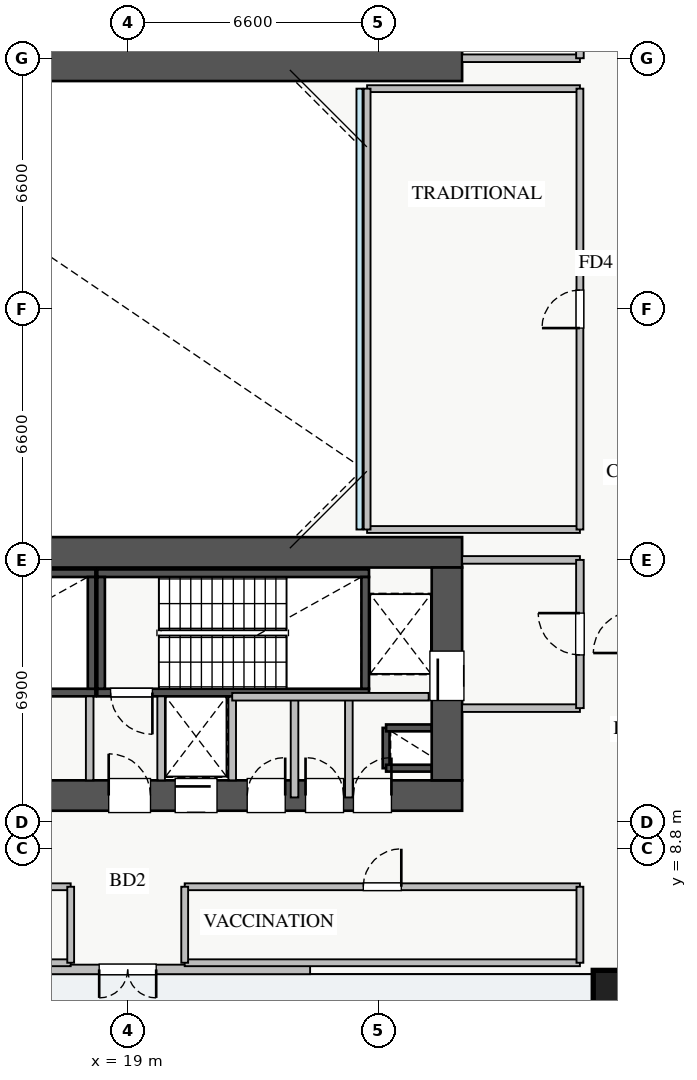
"""IFC4 building model, lengths in metres.
Left out: names, types, materials, properties, quantities, classifications, styles, units other than length and angle.
Written with IfcOpenShell. Run it as: python <this file> out.ifc"""

import sys

from ifc_helpers import new_model, si_unit, direction, frame, frame_2d, origin, origin_2d, place, context, subcontext, project, spatial, rectangle, extrude, source, transform, mapped, element, fill, save


model = new_model("IFC4")
c1 = context("Model", 3, precision=1e-05, world=origin(), true_north=direction((0.0, 1.0)))
c2 = subcontext(c1, "Body", "Model", "MODEL_VIEW")
j1 = project(units=[si_unit("LENGTHUNIT", "METRE"), si_unit("PLANEANGLEUNIT", "RADIAN")], contexts=[c1])
p1 = place(None, origin())
s1 = spatial("IfcSite", under=j1, at=p1, CompositionType="ELEMENT")
p2 = place(p1, origin())
s2 = spatial("IfcBuilding", under=s1, at=p2, CompositionType="ELEMENT")
p3 = place(p2, frame((0.0, 0.0, 13.8)))
s3 = spatial("IfcBuildingStorey", under=s2, at=p3, CompositionType="ELEMENT", Elevation=13.8)
p4 = place(p3, frame((25.8, 10.92, 0.0), z_axis=(0.0, 0.0, 1.0), x_axis=(0.0, 1.0, 0.0)))
e1 = element("IfcWall", 1, at=p4, inside=s3, PredefinedType="SHEAR", context=c2, shape_type="SweptSolid", body=[
    extrude(rectangle(XDim=1.06, YDim=0.18, at=frame_2d((0.53, 0.0))), origin(), (0.0, 0.0, 1.0), 4.15),
])
for number, where, z_axis, x_axis in (
    (2, (25.8, 11.98, 0.0), (0.0, 0.0, 1.0), (1.0, 0.0, 0.0)),
    (3, (25.8, 10.92, 0.0), (0.0, 0.0, 1.0), (1.0, 0.0, 0.0)),
):
    element("IfcWall", number, at=place(p3, frame(where, z_axis=z_axis, x_axis=x_axis)), inside=s3, PredefinedType="SHEAR", context=c2, shape_type="SweptSolid", body=[
        extrude(rectangle(XDim=1.2, YDim=0.18, at=frame_2d((0.6, 0.0))), origin(), (0.0, 0.0, 1.0), 4.15),
    ])
p5 = place(p3, frame((19.88, 12.8, 0.0), z_axis=(0.0, 0.0, 1.0), x_axis=(1.0, 0.0, 0.0)))
e4 = element("IfcWall", 4, at=p5, inside=s3, PredefinedType="SHEAR", context=c2, shape_type="SweptSolid", body=[
    extrude(rectangle(XDim=1.87, YDim=0.18, at=frame_2d((0.935, 0.0))), origin(), (0.0, 0.0, 1.0), 4.15),
])
p6 = place(p3, frame((11.0, 12.91, 0.0), z_axis=(0.0, 0.0, 1.0), x_axis=(1.0, 0.0, 0.0)))
e5 = element("IfcWall", 5, at=p6, inside=s3, PredefinedType="SHEAR", context=c2, shape_type="SweptSolid", body=[
    extrude(rectangle(XDim=7.15, YDim=0.2, at=frame_2d((3.575, 0.0))), origin(), (0.0, 0.0, 1.0), 4.4),
])
p7 = place(p6, frame((0.35, 0.0, 0.0)))
e6 = element("IfcOpeningElement", 6, at=p7, cuts=e5, PredefinedType="OPENING", context=c2, shape_type="SweptSolid", body=[
    extrude(rectangle(XDim=1.1, YDim=2.05, at=frame_2d((0.55, 1.025))), frame((0.0, 0.11, 0.0), z_axis=(0.0, -1.0, 0.0), x_axis=(1.0, 0.0, 0.0)), (0.0, 0.0, 1.0), 0.22),
])
p8 = place(p3, frame((11.0, 16.05, 0.0), z_axis=(0.0, 0.0, 1.0), x_axis=(1.0, 0.0, 0.0)))
e7 = element("IfcWall", 7, at=p8, inside=s3, PredefinedType="SHEAR", context=c2, shape_type="SweptSolid", body=[
    extrude(rectangle(XDim=7.15, YDim=0.2, at=frame_2d((3.575, 0.0))), origin(), (0.0, 0.0, 1.0), 4.4),
])
p9 = place(p3, frame((18.05, 13.01, 0.0), z_axis=(0.0, 0.0, 1.0), x_axis=(0.0, 1.0, 0.0)))
e8 = element("IfcWall", 8, at=p9, inside=s3, PredefinedType="SHEAR", context=c2, shape_type="SweptSolid", body=[
    extrude(rectangle(XDim=2.94, YDim=0.2, at=frame_2d((1.47, 0.0))), origin(), (0.0, 0.0, 1.0), 4.4),
])
p10 = place(p3, frame((18.2, 12.91, 0.0), z_axis=(0.0, 0.0, 1.0), x_axis=(1.0, 0.0, 0.0)))
e9 = element("IfcWall", 9, at=p10, inside=s3, PredefinedType="SHEAR", context=c2, shape_type="SweptSolid", body=[
    extrude(rectangle(XDim=7.15, YDim=0.2, at=frame_2d((3.575, 0.0))), origin(), (0.0, 0.0, 1.0), 4.4),
])
p11 = place(p10, frame((0.35, 0.0, 0.0)))
e10 = element("IfcOpeningElement", 10, at=p11, cuts=e9, PredefinedType="OPENING", context=c2, shape_type="SweptSolid", body=[
    extrude(rectangle(XDim=1.1, YDim=2.05, at=frame_2d((0.55, 1.025))), frame((0.0, 0.11, 0.0), z_axis=(0.0, -1.0, 0.0), x_axis=(1.0, 0.0, 0.0)), (0.0, 0.0, 1.0), 0.22),
])
p12 = place(p3, frame((18.2, 16.05, 0.0), z_axis=(0.0, 0.0, 1.0), x_axis=(1.0, 0.0, 0.0)))
e11 = element("IfcWall", 11, at=p12, inside=s3, PredefinedType="SHEAR", context=c2, shape_type="SweptSolid", body=[
    extrude(rectangle(XDim=7.15, YDim=0.2, at=frame_2d((3.575, 0.0))), origin(), (0.0, 0.0, 1.0), 4.4),
])
for number, where, z_axis, x_axis in (
    (12, (18.3, 13.01, 0.0), (0.0, 0.0, 1.0), (0.0, 1.0, 0.0)),
    (13, (25.25, 13.01, 0.0), (0.0, 0.0, 1.0), (0.0, 1.0, 0.0)),
):
    element("IfcWall", number, at=place(p3, frame(where, z_axis=z_axis, x_axis=x_axis)), inside=s3, PredefinedType="SHEAR", context=c2, shape_type="SweptSolid", body=[
        extrude(rectangle(XDim=2.94, YDim=0.2, at=frame_2d((1.47, 0.0))), origin(), (0.0, 0.0, 1.0), 4.4),
    ])
p13 = place(p3, frame((10.2, 29.4, 0.0), z_axis=(0.0, 0.0, 1.0), x_axis=(1.0, 0.0, 0.0)))
e14 = element("IfcWall", 14, at=p13, inside=s3, PredefinedType="SHEAR", context=c2, shape_type="SweptSolid", body=[
    extrude(rectangle(XDim=17.6, YDim=0.8, at=frame_2d((8.8, 0.0))), origin(), (0.0, 0.0, 1.0), 4.4),
])
p14 = place(p3, frame((10.2, 10.2, 0.0), z_axis=(0.0, 0.0, 1.0), x_axis=(1.0, 0.0, 0.0)))
e15 = element("IfcWall", 15, at=p14, inside=s3, PredefinedType="SHEAR", context=c2, shape_type="SweptSolid", body=[
    extrude(rectangle(XDim=17.6, YDim=0.8, at=frame_2d((8.8, 0.0))), origin(), (0.0, 0.0, 1.0), 4.4),
])
p15 = place(p14, frame((1.15, 0.0, 0.0)))
e16 = element("IfcOpeningElement", 16, at=p15, cuts=e15, PredefinedType="OPENING", context=c2, shape_type="SweptSolid", body=[
    extrude(rectangle(XDim=1.1, YDim=2.05, at=frame_2d((0.55, 1.025))), frame((0.0, 0.41, 0.0), z_axis=(0.0, -1.0, 0.0), x_axis=(1.0, 0.0, 0.0)), (0.0, 0.0, 1.0), 0.82),
])
p16 = place(p14, frame((8.3, 0.0, 0.0)))
e17 = element("IfcOpeningElement", 17, at=p16, cuts=e15, PredefinedType="OPENING", context=c2, shape_type="SweptSolid", body=[
    extrude(rectangle(XDim=1.1, YDim=2.05, at=frame_2d((0.55, 1.025))), frame((0.0, 0.41, 0.0), z_axis=(0.0, -1.0, 0.0), x_axis=(1.0, 0.0, 0.0)), (0.0, 0.0, 1.0), 0.82),
])
p17 = place(p14, frame((10.05, 0.0, 0.0)))
e18 = element("IfcOpeningElement", 18, at=p17, cuts=e15, PredefinedType="OPENING", context=c2, shape_type="SweptSolid", body=[
    extrude(rectangle(XDim=1.1, YDim=2.05, at=frame_2d((0.55, 1.025))), frame((0.0, 0.41, 0.0), z_axis=(0.0, -1.0, 0.0), x_axis=(1.0, 0.0, 0.0)), (0.0, 0.0, 1.0), 0.82),
])
p18 = place(p14, frame((14.74, 0.0, 0.0)))
e19 = element("IfcOpeningElement", 19, at=p18, cuts=e15, PredefinedType="OPENING", context=c2, shape_type="SweptSolid", body=[
    extrude(rectangle(XDim=1.0, YDim=2.05, at=frame_2d((0.5, 1.025))), frame((0.0, 0.41, 0.0), z_axis=(0.0, -1.0, 0.0), x_axis=(1.0, 0.0, 0.0)), (0.0, 0.0, 1.0), 0.82),
])
p19 = place(p14, frame((11.945, 0.0, 0.0)))
e20 = element("IfcOpeningElement", 20, at=p19, cuts=e15, PredefinedType="OPENING", context=c2, shape_type="SweptSolid", body=[
    extrude(rectangle(XDim=1.0, YDim=2.05, at=frame_2d((0.5, 1.025))), frame((0.0, 0.41, 0.0), z_axis=(0.0, -1.0, 0.0), x_axis=(1.0, 0.0, 0.0)), (0.0, 0.0, 1.0), 0.82),
])
p20 = place(p14, frame((13.48, 0.0, 0.0)))
e21 = element("IfcOpeningElement", 21, at=p20, cuts=e15, PredefinedType="OPENING", context=c2, shape_type="SweptSolid", body=[
    extrude(rectangle(XDim=1.0, YDim=2.05, at=frame_2d((0.5, 1.025))), frame((0.0, 0.41, 0.0), z_axis=(0.0, -1.0, 0.0), x_axis=(1.0, 0.0, 0.0)), (0.0, 0.0, 1.0), 0.82),
])
p21 = place(p3, frame((10.2, 16.6, 0.0), z_axis=(0.0, 0.0, 1.0), x_axis=(1.0, 0.0, 0.0)))
e22 = element("IfcWall", 22, at=p21, inside=s3, PredefinedType="SHEAR", context=c2, shape_type="SweptSolid", body=[
    extrude(rectangle(XDim=17.6, YDim=0.8, at=frame_2d((8.8, 0.0))), origin(), (0.0, 0.0, 1.0), 4.4),
])
p22 = place(p3, frame((27.4, 10.6, 0.0), z_axis=(0.0, 0.0, 1.0), x_axis=(0.0, 1.0, 0.0)))
e23 = element("IfcWall", 23, at=p22, inside=s3, PredefinedType="SHEAR", context=c2, shape_type="SweptSolid", body=[
    extrude(rectangle(XDim=5.6, YDim=0.8, at=frame_2d((2.8, 0.0))), origin(), (0.0, 0.0, 1.0), 4.4),
])
p23 = place(p22, frame((2.1, 0.0, 0.0)))
e24 = element("IfcOpeningElement", 24, at=p23, cuts=e23, PredefinedType="OPENING", context=c2, shape_type="SweptSolid", body=[
    extrude(rectangle(XDim=1.3, YDim=2.05, at=frame_2d((0.65, 1.025))), frame((0.0, 0.41, 0.0), z_axis=(0.0, -1.0, 0.0), x_axis=(1.0, 0.0, 0.0)), (0.0, 0.0, 1.0), 0.82),
])
m1 = source(origin(), c2, "Body", "SweptSolid", [
    extrude(rectangle(XDim=1.5, YDim=1.5, at=origin_2d()), origin(), (0.0, 0.0, 1.0), 4.4),
])
p24 = place(p3, frame((32.0, 4.85, 0.0), z_axis=(0.0, 0.0, 1.0), x_axis=(1.0, 0.0, 0.0)))
e25 = element("IfcColumn", 25, at=p24, inside=s3, PredefinedType="COLUMN", context=c2, shape_type="MappedRepresentation", body=[
    mapped(m1, transform((0.0, 0.0, 0.0), x_axis=(1.0, 0.0, 0.0), y_axis=(0.0, 1.0, 0.0), z_axis=(0.0, 0.0, 1.0), scale=1.0)),
])
p25 = place(p3, frame((14.2, 5.625, 0.0), z_axis=(0.0, 0.0, 1.0), x_axis=(1.0, 0.0, 0.0)))
e26 = element("IfcWall", 26, at=p25, inside=s3, PredefinedType="STANDARD", context=c2, shape_type="SweptSolid", body=[
    extrude(rectangle(XDim=9.6, YDim=0.25, at=frame_2d((4.8, 0.0))), origin(), (0.0, 0.0, 1.0), 3.69),
])
p26 = place(p25, frame((4.05, 0.0, 0.0)))
e27 = element("IfcOpeningElement", 27, at=p26, cuts=e26, PredefinedType="OPENING", context=c2, shape_type="SweptSolid", body=[
    extrude(rectangle(XDim=1.5, YDim=2.15, at=frame_2d((0.75, 1.075))), frame((0.0, 0.135, 0.0), z_axis=(0.0, -1.0, 0.0), x_axis=(1.0, 0.0, 0.0)), (0.0, 0.0, 1.0), 0.27),
])
p27 = place(p3, frame((27.8, 29.6, 0.0), z_axis=(0.0, 0.0, 1.0), x_axis=(1.0, 0.0, 0.0)))
e28 = element("IfcWall", 28, at=p27, inside=s3, PredefinedType="PARTITIONING", context=c2, shape_type="SweptSolid", body=[
    extrude(rectangle(XDim=3.1, YDim=0.2, at=frame_2d((1.55, 0.0))), origin(), (0.0, 0.0, 1.0), 3.445),
])
p28 = place(p3, frame((30.9, 29.6, 0.0), z_axis=(0.0, 0.0, 1.0), x_axis=(0.0, 1.0, 0.0)))
e29 = element("IfcWall", 29, at=p28, inside=s3, PredefinedType="PARTITIONING", context=c2, shape_type="SweptSolid", body=[
    extrude(rectangle(XDim=3.9, YDim=0.2, at=frame_2d((1.95, 0.0))), origin(), (0.0, 0.0, 1.0), 4.15),
])
p29 = place(p28, frame((1.4, 0.0, 0.0)))
e30 = element("IfcOpeningElement", 30, at=p29, cuts=e29, PredefinedType="OPENING", context=c2, shape_type="SweptSolid", body=[
    extrude(rectangle(XDim=1.1, YDim=2.05, at=frame_2d((0.55, 1.025))), frame((0.0, 0.11, 0.0), z_axis=(0.0, -1.0, 0.0), x_axis=(1.0, 0.0, 0.0)), (0.0, 0.0, 1.0), 0.22),
])
for number, where, z_axis, x_axis in (
    (31, (27.8, 16.4, 0.0), (0.0, 0.0, 1.0), (1.0, 0.0, 0.0)),
    (32, (27.8, 12.5, 0.0), (0.0, 0.0, 1.0), (1.0, 0.0, 0.0)),
):
    element("IfcWall", number, at=place(p3, frame(where, z_axis=z_axis, x_axis=x_axis)), inside=s3, PredefinedType="PARTITIONING", context=c2, shape_type="SweptSolid", body=[
        extrude(rectangle(XDim=3.1, YDim=0.2, at=frame_2d((1.55, 0.0))), origin(), (0.0, 0.0, 1.0), 3.445),
    ])
p30 = place(p3, frame((30.9, 12.5, 0.0), z_axis=(0.0, 0.0, 1.0), x_axis=(0.0, 1.0, 0.0)))
e33 = element("IfcWall", 33, at=p30, inside=s3, PredefinedType="PARTITIONING", context=c2, shape_type="SweptSolid", body=[
    extrude(rectangle(XDim=3.9, YDim=0.2, at=frame_2d((1.95, 0.0))), origin(), (0.0, 0.0, 1.0), 4.15),
])
p31 = place(p30, frame((1.4, 0.0, 0.0)))
e34 = element("IfcOpeningElement", 34, at=p31, cuts=e33, PredefinedType="OPENING", context=c2, shape_type="SweptSolid", body=[
    extrude(rectangle(XDim=1.1, YDim=2.05, at=frame_2d((0.55, 1.025))), frame((0.0, 0.11, 0.0), z_axis=(0.0, -1.0, 0.0), x_axis=(1.0, 0.0, 0.0)), (0.0, 0.0, 1.0), 0.22),
])
for number, where, z_axis, x_axis in (
    (35, (18.0, 10.6, 0.0), (0.0, 0.0, 1.0), (0.0, 1.0, 0.0)),
    (36, (19.88, 10.6, 0.0), (0.0, 0.0, 1.0), (0.0, 1.0, 0.0)),
):
    element("IfcWall", number, at=place(p3, frame(where, z_axis=z_axis, x_axis=x_axis)), inside=s3, PredefinedType="PARTITIONING", context=c2, shape_type="SweptSolid", body=[
        extrude(rectangle(XDim=2.21, YDim=0.2, at=frame_2d((1.105, 0.0))), origin(), (0.0, 0.0, 1.0), 4.15),
    ])
p32 = place(p3, frame((24.82, 10.15, 0.0), z_axis=(0.0, 0.0, 1.0), x_axis=(0.0, 1.0, 0.0)))
e37 = element("IfcWall", 37, at=p32, inside=s3, PredefinedType="PARTITIONING", context=c2, shape_type="SweptSolid", body=[
    extrude(rectangle(XDim=2.65, YDim=0.2, at=frame_2d((1.325, 0.0))), origin(), (0.0, 0.0, 1.0), 4.15),
])
p33 = place(p3, frame((21.75, 10.6, 0.0), z_axis=(0.0, 0.0, 1.0), x_axis=(0.0, 1.0, 0.0)))
e38 = element("IfcWall", 38, at=p33, inside=s3, PredefinedType="PARTITIONING", context=c2, shape_type="SweptSolid", body=[
    extrude(rectangle(XDim=2.2, YDim=0.2, at=frame_2d((1.1, 0.0))), origin(), (0.0, 0.0, 1.0), 4.15),
])
p34 = place(p3, frame((23.39, 10.15, 0.0), z_axis=(0.0, 0.0, 1.0), x_axis=(0.0, 1.0, 0.0)))
e39 = element("IfcWall", 39, at=p34, inside=s3, PredefinedType="PARTITIONING", context=c2, shape_type="SweptSolid", body=[
    extrude(rectangle(XDim=2.65, YDim=0.2, at=frame_2d((1.325, 0.0))), origin(), (0.0, 0.0, 1.0), 4.15),
])
p35 = place(p3, frame((21.75, 12.8, 0.0), z_axis=(0.0, 0.0, 1.0), x_axis=(1.0, 0.0, 0.0)))
e40 = element("IfcWall", 40, at=p35, inside=s3, PredefinedType="PARTITIONING", context=c2, shape_type="SweptSolid", body=[
    extrude(rectangle(XDim=5.17, YDim=0.2, at=frame_2d((2.585, 0.0))), origin(), (0.0, 0.0, 1.0), 4.15),
])
for number, where, z_axis, x_axis in (
    (41, (25.3, 17.2, 0.0), (0.0, 0.0, 1.0), (1.0, 0.0, 0.0)),
    (42, (25.3, 28.8, 0.0), (0.0, 0.0, 1.0), (1.0, 0.0, 0.0)),
):
    element("IfcWall", number, at=place(p3, frame(where, z_axis=z_axis, x_axis=x_axis)), inside=s3, PredefinedType="PARTITIONING", context=c2, shape_type="SweptSolid", body=[
        extrude(rectangle(XDim=5.6, YDim=0.18, at=frame_2d((2.8, 0.0))), origin(), (0.0, 0.0, 1.0), 4.15),
    ])
p36 = place(p3, frame((25.3, 17.2, 0.0), z_axis=(0.0, 0.0, 1.0), x_axis=(0.0, 1.0, 0.0)))
e43 = element("IfcWall", 43, at=p36, inside=s3, PredefinedType="PARTITIONING", context=c2, shape_type="SweptSolid", body=[
    extrude(rectangle(XDim=11.6, YDim=0.18, at=frame_2d((5.8, 0.0))), origin(), (0.0, 0.0, 1.0), 4.15),
])
p37 = place(p3, frame((30.9, 17.2, 0.0), z_axis=(0.0, 0.0, 1.0), x_axis=(0.0, 1.0, 0.0)))
e44 = element("IfcWall", 44, at=p37, inside=s3, PredefinedType="PARTITIONING", context=c2, shape_type="SweptSolid", body=[
    extrude(rectangle(XDim=11.6, YDim=0.18, at=frame_2d((5.8, 0.0))), origin(), (0.0, 0.0, 1.0), 4.15),
])
p38 = place(p37, frame((5.3, 0.0, 0.0)))
e45 = element("IfcOpeningElement", 45, at=p38, cuts=e44, PredefinedType="OPENING", context=c2, shape_type="SweptSolid", body=[
    extrude(rectangle(XDim=1.0, YDim=2.05, at=frame_2d((0.5, 1.025))), frame((0.0, 0.1, 0.0), z_axis=(0.0, -1.0, 0.0), x_axis=(1.0, 0.0, 0.0)), (0.0, 0.0, 1.0), 0.2),
])
p39 = place(p3, frame((10.2, 5.8, 0.0), z_axis=(0.0, 0.0, 1.0), x_axis=(1.0, 0.0, 0.0)))
e46 = element("IfcWall", 46, at=p39, inside=s3, PredefinedType="PARTITIONING", context=c2, shape_type="SweptSolid", body=[
    extrude(rectangle(XDim=7.3, YDim=0.18, at=frame_2d((3.65, 0.0))), origin(), (0.0, 0.0, 1.0), 4.15),
])
p40 = place(p3, frame((10.2, 7.8, 0.0), z_axis=(0.0, 0.0, 1.0), x_axis=(1.0, 0.0, 0.0)))
e47 = element("IfcWall", 47, at=p40, inside=s3, PredefinedType="PARTITIONING", context=c2, shape_type="SweptSolid", body=[
    extrude(rectangle(XDim=7.3, YDim=0.18, at=frame_2d((3.65, 0.0))), origin(), (0.0, 0.0, 1.0), 4.15),
])
p41 = place(p40, frame((3.15, 0.0, 0.0)))
e48 = element("IfcOpeningElement", 48, at=p41, cuts=e47, PredefinedType="OPENING", context=c2, shape_type="SweptSolid", body=[
    extrude(rectangle(XDim=1.0, YDim=2.05, at=frame_2d((0.5, 1.025))), frame((0.0, 0.1, 0.0), z_axis=(0.0, -1.0, 0.0), x_axis=(1.0, 0.0, 0.0)), (0.0, 0.0, 1.0), 0.2),
])
p42 = place(p3, frame((17.5, 5.8, 0.0), z_axis=(0.0, 0.0, 1.0), x_axis=(0.0, 1.0, 0.0)))
e49 = element("IfcWall", 49, at=p42, inside=s3, PredefinedType="PARTITIONING", context=c2, shape_type="SweptSolid", body=[
    extrude(rectangle(XDim=2.0, YDim=0.18, at=frame_2d((1.0, 0.0))), origin(), (0.0, 0.0, 1.0), 4.15),
])
p43 = place(p3, frame((20.5, 5.8, 0.0), z_axis=(0.0, 0.0, 1.0), x_axis=(1.0, 0.0, 0.0)))
e50 = element("IfcWall", 50, at=p43, inside=s3, PredefinedType="PARTITIONING", context=c2, shape_type="SweptSolid", body=[
    extrude(rectangle(XDim=10.4, YDim=0.18, at=frame_2d((5.2, 0.0))), origin(), (0.0, 0.0, 1.0), 4.15),
])
p44 = place(p3, frame((20.5, 7.8, 0.0), z_axis=(0.0, 0.0, 1.0), x_axis=(1.0, 0.0, 0.0)))
e51 = element("IfcWall", 51, at=p44, inside=s3, PredefinedType="PARTITIONING", context=c2, shape_type="SweptSolid", body=[
    extrude(rectangle(XDim=10.4, YDim=0.18, at=frame_2d((5.2, 0.0))), origin(), (0.0, 0.0, 1.0), 4.15),
])
p45 = place(p44, frame((4.7, 0.0, 0.0)))
e52 = element("IfcOpeningElement", 52, at=p45, cuts=e51, PredefinedType="OPENING", context=c2, shape_type="SweptSolid", body=[
    extrude(rectangle(XDim=1.0, YDim=2.05, at=frame_2d((0.5, 1.025))), frame((0.0, 0.1, 0.0), z_axis=(0.0, -1.0, 0.0), x_axis=(1.0, 0.0, 0.0)), (0.0, 0.0, 1.0), 0.2),
])
for number, where, z_axis, x_axis in (
    (53, (20.5, 5.8, 0.0), (0.0, 0.0, 1.0), (0.0, 1.0, 0.0)),
    (54, (30.9, 5.8, 0.0), (0.0, 0.0, 1.0), (0.0, 1.0, 0.0)),
):
    element("IfcWall", number, at=place(p3, frame(where, z_axis=z_axis, x_axis=x_axis)), inside=s3, PredefinedType="PARTITIONING", context=c2, shape_type="SweptSolid", body=[
        extrude(rectangle(XDim=2.0, YDim=0.18, at=frame_2d((1.0, 0.0))), origin(), (0.0, 0.0, 1.0), 4.15),
    ])
m2 = source(origin(), c2, "Body", "SweptSolid", [
    extrude(rectangle(XDim=1.5, YDim=2.15, at=frame_2d((0.75, 1.075))), frame((0.0, 0.025, 0.0), z_axis=(0.0, -1.0, 0.0), x_axis=(1.0, 0.0, 0.0)), (0.0, 0.0, 1.0), 0.05),
])
p46 = place(p26, frame((1.5, 0.0, 0.0), z_axis=(0.0, 0.0, 1.0), x_axis=(-1.0, 0.0, 0.0)))
e55 = element("IfcDoor", 55, at=p46, inside=s3, OperationType="DOUBLE_DOOR_SINGLE_SWING", PredefinedType="DOOR", context=c2, shape_type="MappedRepresentation", body=[
    mapped(m2, transform((0.0, 0.0, 0.0), x_axis=(1.0, 0.0, 0.0), y_axis=(0.0, 1.0, 0.0), z_axis=(0.0, 0.0, 1.0), scale=1.0)),
])
fill(e27, e55)
m3 = source(origin(), c2, "Body", "SweptSolid", [
    extrude(rectangle(XDim=1.3, YDim=2.05, at=frame_2d((0.65, 1.025))), frame((0.0, 0.025, 0.0), z_axis=(0.0, -1.0, 0.0), x_axis=(1.0, 0.0, 0.0)), (0.0, 0.0, 1.0), 0.05),
])
p47 = place(p23, origin())
e56 = element("IfcDoor", 56, at=p47, inside=s3, OperationType="SLIDING_TO_RIGHT", PredefinedType="DOOR", context=c2, shape_type="MappedRepresentation", body=[
    mapped(m3, transform((0.0, 0.0, 0.0), x_axis=(1.0, 0.0, 0.0), y_axis=(0.0, 1.0, 0.0), z_axis=(0.0, 0.0, 1.0), scale=1.0)),
])
fill(e24, e56)
m4 = source(origin(), c2, "Body", "SweptSolid", [
    extrude(rectangle(XDim=1.1, YDim=2.05, at=frame_2d((0.55, 1.025))), frame((0.0, 0.025, 0.0), z_axis=(0.0, -1.0, 0.0), x_axis=(1.0, 0.0, 0.0)), (0.0, 0.0, 1.0), 0.05),
])
p48 = place(p16, origin())
e57 = element("IfcDoor", 57, at=p48, inside=s3, OperationType="SINGLE_SWING_LEFT", PredefinedType="DOOR", context=c2, shape_type="MappedRepresentation", body=[
    mapped(m4, transform((0.0, 0.0, 0.0), x_axis=(1.0, 0.0, 0.0), y_axis=(0.0, 1.0, 0.0), z_axis=(0.0, 0.0, 1.0), scale=1.0)),
])
fill(e17, e57)
p49 = place(p11, frame((1.1, 0.0, 0.0), z_axis=(0.0, 0.0, 1.0), x_axis=(-1.0, 0.0, 0.0)))
e58 = element("IfcDoor", 58, at=p49, inside=s3, OperationType="SINGLE_SWING_RIGHT", PredefinedType="DOOR", context=c2, shape_type="MappedRepresentation", body=[
    mapped(m4, transform((0.0, 0.0, 0.0), x_axis=(1.0, 0.0, 0.0), y_axis=(0.0, 1.0, 0.0), z_axis=(0.0, 0.0, 1.0), scale=1.0)),
])
fill(e10, e58)
p50 = place(p17, origin())
e59 = element("IfcDoor", 59, at=p50, inside=s3, OperationType="SLIDING_TO_RIGHT", PredefinedType="DOOR", context=c2, shape_type="MappedRepresentation", body=[
    mapped(m4, transform((0.0, 0.0, 0.0), x_axis=(1.0, 0.0, 0.0), y_axis=(0.0, 1.0, 0.0), z_axis=(0.0, 0.0, 1.0), scale=1.0)),
])
fill(e18, e59)
m5 = source(origin(), c2, "Body", "SweptSolid", [
    extrude(rectangle(XDim=1.0, YDim=2.05, at=frame_2d((0.5, 1.025))), frame((0.0, 0.025, 0.0), z_axis=(0.0, -1.0, 0.0), x_axis=(1.0, 0.0, 0.0)), (0.0, 0.0, 1.0), 0.05),
])
p51 = place(p18, origin())
e60 = element("IfcDoor", 60, at=p51, inside=s3, OperationType="SINGLE_SWING_RIGHT", PredefinedType="DOOR", context=c2, shape_type="MappedRepresentation", body=[
    mapped(m5, transform((0.0, 0.0, 0.0), x_axis=(1.0, 0.0, 0.0), y_axis=(0.0, 1.0, 0.0), z_axis=(0.0, 0.0, 1.0), scale=1.0)),
])
fill(e19, e60)
p52 = place(p19, origin())
e61 = element("IfcDoor", 61, at=p52, inside=s3, OperationType="SINGLE_SWING_RIGHT", PredefinedType="DOOR", context=c2, shape_type="MappedRepresentation", body=[
    mapped(m5, transform((0.0, 0.0, 0.0), x_axis=(1.0, 0.0, 0.0), y_axis=(0.0, 1.0, 0.0), z_axis=(0.0, 0.0, 1.0), scale=1.0)),
])
fill(e20, e61)
p53 = place(p20, origin())
e62 = element("IfcDoor", 62, at=p53, inside=s3, OperationType="SINGLE_SWING_LEFT", PredefinedType="DOOR", context=c2, shape_type="MappedRepresentation", body=[
    mapped(m5, transform((0.0, 0.0, 0.0), x_axis=(1.0, 0.0, 0.0), y_axis=(0.0, 1.0, 0.0), z_axis=(0.0, 0.0, 1.0), scale=1.0)),
])
fill(e21, e62)
p54 = place(p31, origin())
e63 = element("IfcDoor", 63, at=p54, inside=s3, OperationType="SINGLE_SWING_RIGHT", PredefinedType="DOOR", context=c2, shape_type="MappedRepresentation", body=[
    mapped(m4, transform((0.0, 0.0, 0.0), x_axis=(1.0, 0.0, 0.0), y_axis=(0.0, 1.0, 0.0), z_axis=(0.0, 0.0, 1.0), scale=1.0)),
])
fill(e34, e63)
p55 = place(p38, origin())
e64 = element("IfcDoor", 64, at=p55, inside=s3, OperationType="SINGLE_SWING_LEFT", PredefinedType="DOOR", context=c2, shape_type="MappedRepresentation", body=[
    mapped(m5, transform((0.0, 0.0, 0.0), x_axis=(1.0, 0.0, 0.0), y_axis=(0.0, 1.0, 0.0), z_axis=(0.0, 0.0, 1.0), scale=1.0)),
])
fill(e45, e64)
p56 = place(p45, origin())
e65 = element("IfcDoor", 65, at=p56, inside=s3, OperationType="SINGLE_SWING_RIGHT", PredefinedType="DOOR", context=c2, shape_type="MappedRepresentation", body=[
    mapped(m5, transform((0.0, 0.0, 0.0), x_axis=(1.0, 0.0, 0.0), y_axis=(0.0, 1.0, 0.0), z_axis=(0.0, 0.0, 1.0), scale=1.0)),
])
fill(e52, e65)
save(model, sys.argv[1])
